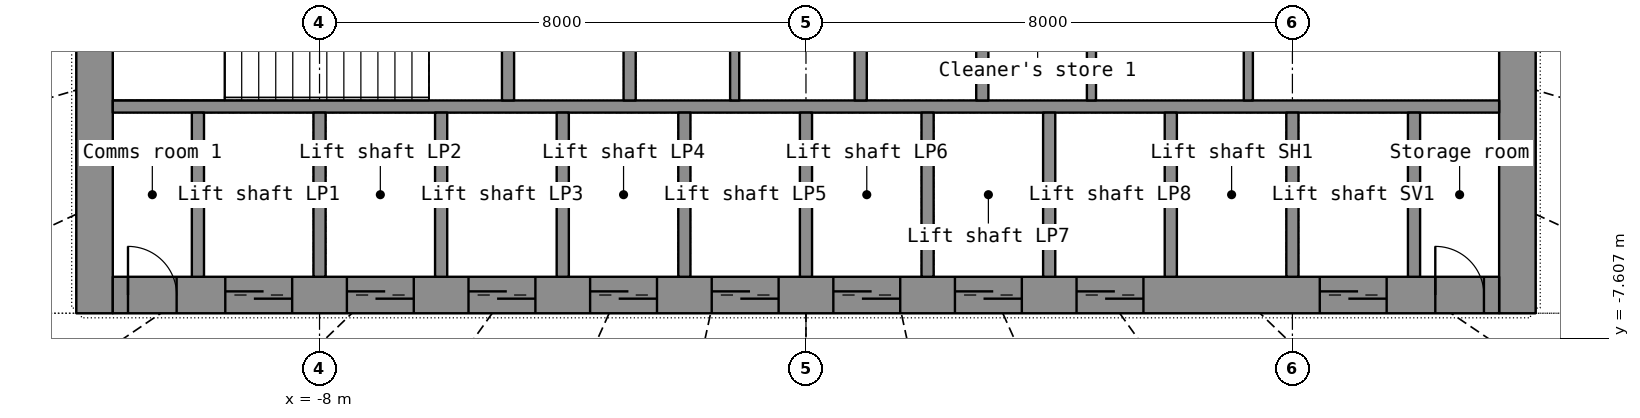
"""IFC4 building model, lengths in metres.
Left out: names, types, materials, properties, quantities, classifications, styles, units other than length and angle.
Written with IfcOpenShell. Run it as: python <this file> out.ifc"""

import sys

from ifc_helpers import new_model, si_unit, direction, frame, frame_2d, origin, place, context, subcontext, project, spatial, rectangle, extrude, element, fill, save


model = new_model("IFC4")
c1 = context("Model", 3, precision=1e-05, world=origin(), true_north=direction((0.0, 1.0)))
c2 = subcontext(c1, "Body", "Model", "MODEL_VIEW")
j1 = project(units=[si_unit("LENGTHUNIT", "METRE"), si_unit("PLANEANGLEUNIT", "RADIAN")], contexts=[c1])
p1 = place(None, origin())
s1 = spatial("IfcSite", under=j1, at=p1, CompositionType="ELEMENT")
p2 = place(p1, origin())
s2 = spatial("IfcBuilding", under=s1, at=p2, CompositionType="ELEMENT")
p3 = place(p2, frame((0.0, 0.0, 20.0)))
s3 = spatial("IfcBuildingStorey", under=s2, at=p3, CompositionType="ELEMENT", Elevation=20.0)
p4 = place(p3, frame((-11.7, -7.2, 0.0), z_axis=(0.0, 0.0, 1.0), x_axis=(0.0, 1.0, 0.0)))
e1 = element("IfcWall", 1, at=p4, inside=s3, PredefinedType="SHEAR", context=c2, shape_type="SweptSolid", body=[
    extrude(rectangle(XDim=14.4, YDim=0.6, at=frame_2d((7.2, 0.0))), origin(), (0.0, 0.0, 1.0), 4.1),
])
p5 = place(p4, frame((6.5, 0.0, 0.0)))
e2 = element("IfcOpeningElement", 2, at=p5, cuts=e1, PredefinedType="OPENING", context=c2, shape_type="SweptSolid", body=[
    extrude(rectangle(XDim=1.4, YDim=2.2, at=frame_2d((0.7, 1.1))), frame((0.0, 0.31, 0.0), z_axis=(0.0, -1.0, 0.0), x_axis=(1.0, 0.0, 0.0)), (0.0, 0.0, 1.0), 0.62),
])
p6 = place(p3, frame((11.7, -7.2, 0.0), z_axis=(0.0, 0.0, 1.0), x_axis=(0.0, 1.0, 0.0)))
e3 = element("IfcWall", 3, at=p6, inside=s3, PredefinedType="SHEAR", context=c2, shape_type="SweptSolid", body=[
    extrude(rectangle(XDim=14.4, YDim=0.6, at=frame_2d((7.2, 0.0))), origin(), (0.0, 0.0, 1.0), 4.1),
])
p7 = place(p6, frame((6.5, 0.0, 0.0)))
e4 = element("IfcOpeningElement", 4, at=p7, cuts=e3, PredefinedType="OPENING", context=c2, shape_type="SweptSolid", body=[
    extrude(rectangle(XDim=1.4, YDim=2.2, at=frame_2d((0.7, 1.1))), frame((0.0, 0.31, 0.0), z_axis=(0.0, -1.0, 0.0), x_axis=(1.0, 0.0, 0.0)), (0.0, 0.0, 1.0), 0.62),
])
p8 = place(p3, frame((-11.4, -6.9, 0.0), z_axis=(0.0, 0.0, 1.0), x_axis=(1.0, 0.0, 0.0)))
e5 = element("IfcWall", 5, at=p8, inside=s3, PredefinedType="SHEAR", context=c2, shape_type="SweptSolid", body=[
    extrude(rectangle(XDim=22.8, YDim=0.6, at=frame_2d((11.4, 0.0))), origin(), (0.0, 0.0, 1.0), 4.1),
])
p9 = place(p8, frame((1.85, 0.0, 0.0)))
e6 = element("IfcOpeningElement", 6, at=p9, cuts=e5, PredefinedType="OPENING", context=c2, shape_type="SweptSolid", body=[
    extrude(rectangle(XDim=1.1, YDim=2.2, at=frame_2d((0.55, 1.1))), frame((0.0, 0.31, 0.0), z_axis=(0.0, -1.0, 0.0), x_axis=(1.0, 0.0, 0.0)), (0.0, 0.0, 1.0), 0.62),
])
p10 = place(p8, frame((3.85, 0.0, 0.0)))
e7 = element("IfcOpeningElement", 7, at=p10, cuts=e5, PredefinedType="OPENING", context=c2, shape_type="SweptSolid", body=[
    extrude(rectangle(XDim=1.1, YDim=2.2, at=frame_2d((0.55, 1.1))), frame((0.0, 0.31, 0.0), z_axis=(0.0, -1.0, 0.0), x_axis=(1.0, 0.0, 0.0)), (0.0, 0.0, 1.0), 0.62),
])
p11 = place(p8, frame((5.85, 0.0, 0.0)))
e8 = element("IfcOpeningElement", 8, at=p11, cuts=e5, PredefinedType="OPENING", context=c2, shape_type="SweptSolid", body=[
    extrude(rectangle(XDim=1.1, YDim=2.2, at=frame_2d((0.55, 1.1))), frame((0.0, 0.31, 0.0), z_axis=(0.0, -1.0, 0.0), x_axis=(1.0, 0.0, 0.0)), (0.0, 0.0, 1.0), 0.62),
])
p12 = place(p8, frame((7.85, 0.0, 0.0)))
e9 = element("IfcOpeningElement", 9, at=p12, cuts=e5, PredefinedType="OPENING", context=c2, shape_type="SweptSolid", body=[
    extrude(rectangle(XDim=1.1, YDim=2.2, at=frame_2d((0.55, 1.1))), frame((0.0, 0.31, 0.0), z_axis=(0.0, -1.0, 0.0), x_axis=(1.0, 0.0, 0.0)), (0.0, 0.0, 1.0), 0.62),
])
p13 = place(p8, frame((9.85, 0.0, 0.0)))
e10 = element("IfcOpeningElement", 10, at=p13, cuts=e5, PredefinedType="OPENING", context=c2, shape_type="SweptSolid", body=[
    extrude(rectangle(XDim=1.1, YDim=2.2, at=frame_2d((0.55, 1.1))), frame((0.0, 0.31, 0.0), z_axis=(0.0, -1.0, 0.0), x_axis=(1.0, 0.0, 0.0)), (0.0, 0.0, 1.0), 0.62),
])
p14 = place(p8, frame((11.85, 0.0, 0.0)))
e11 = element("IfcOpeningElement", 11, at=p14, cuts=e5, PredefinedType="OPENING", context=c2, shape_type="SweptSolid", body=[
    extrude(rectangle(XDim=1.1, YDim=2.2, at=frame_2d((0.55, 1.1))), frame((0.0, 0.31, 0.0), z_axis=(0.0, -1.0, 0.0), x_axis=(1.0, 0.0, 0.0)), (0.0, 0.0, 1.0), 0.62),
])
p15 = place(p8, frame((13.85, 0.0, 0.0)))
e12 = element("IfcOpeningElement", 12, at=p15, cuts=e5, PredefinedType="OPENING", context=c2, shape_type="SweptSolid", body=[
    extrude(rectangle(XDim=1.1, YDim=2.2, at=frame_2d((0.55, 1.1))), frame((0.0, 0.31, 0.0), z_axis=(0.0, -1.0, 0.0), x_axis=(1.0, 0.0, 0.0)), (0.0, 0.0, 1.0), 0.62),
])
p16 = place(p8, frame((15.85, 0.0, 0.0)))
e13 = element("IfcOpeningElement", 13, at=p16, cuts=e5, PredefinedType="OPENING", context=c2, shape_type="SweptSolid", body=[
    extrude(rectangle(XDim=1.1, YDim=2.2, at=frame_2d((0.55, 1.1))), frame((0.0, 0.31, 0.0), z_axis=(0.0, -1.0, 0.0), x_axis=(1.0, 0.0, 0.0)), (0.0, 0.0, 1.0), 0.62),
])
p17 = place(p8, frame((19.85, 0.0, 0.0)))
e14 = element("IfcOpeningElement", 14, at=p17, cuts=e5, PredefinedType="OPENING", context=c2, shape_type="SweptSolid", body=[
    extrude(rectangle(XDim=1.1, YDim=2.2, at=frame_2d((0.55, 1.1))), frame((0.0, 0.31, 0.0), z_axis=(0.0, -1.0, 0.0), x_axis=(1.0, 0.0, 0.0)), (0.0, 0.0, 1.0), 0.62),
])
p18 = place(p8, frame((0.25, 0.0, 0.0)))
e15 = element("IfcOpeningElement", 15, at=p18, cuts=e5, PredefinedType="OPENING", context=c2, shape_type="SweptSolid", body=[
    extrude(rectangle(XDim=0.8, YDim=2.05, at=frame_2d((0.4, 1.025))), frame((0.0, 0.31, 0.0), z_axis=(0.0, -1.0, 0.0), x_axis=(1.0, 0.0, 0.0)), (0.0, 0.0, 1.0), 0.62),
])
p19 = place(p8, frame((21.75, 0.0, 0.0)))
e16 = element("IfcOpeningElement", 16, at=p19, cuts=e5, PredefinedType="OPENING", context=c2, shape_type="SweptSolid", body=[
    extrude(rectangle(XDim=0.8, YDim=2.05, at=frame_2d((0.4, 1.025))), frame((0.0, 0.31, 0.0), z_axis=(0.0, -1.0, 0.0), x_axis=(1.0, 0.0, 0.0)), (0.0, 0.0, 1.0), 0.62),
])
p20 = place(p3, frame((-11.4, -3.8, 0.0), z_axis=(0.0, 0.0, 1.0), x_axis=(1.0, 0.0, 0.0)))
e17 = element("IfcWall", 17, at=p20, inside=s3, PredefinedType="SHEAR", context=c2, shape_type="SweptSolid", body=[
    extrude(rectangle(XDim=22.8, YDim=0.2, at=frame_2d((11.4, 0.0))), origin(), (0.0, 0.0, 1.0), 4.1),
])
for number, where, z_axis, x_axis in (
    (18, (-10.0, -6.6, 0.0), (0.0, 0.0, 1.0), (0.0, 1.0, 0.0)),
    (19, (-8.0, -6.6, 0.0), (0.0, 0.0, 1.0), (0.0, 1.0, 0.0)),
    (20, (-6.0, -6.6, 0.0), (0.0, 0.0, 1.0), (0.0, 1.0, 0.0)),
    (21, (-4.0, -6.6, 0.0), (0.0, 0.0, 1.0), (0.0, 1.0, 0.0)),
    (22, (-2.0, -6.6, 0.0), (0.0, 0.0, 1.0), (0.0, 1.0, 0.0)),
    (23, (0.0, -6.6, 0.0), (0.0, 0.0, 1.0), (0.0, 1.0, 0.0)),
    (24, (2.0, -6.6, 0.0), (0.0, 0.0, 1.0), (0.0, 1.0, 0.0)),
    (25, (4.0, -6.6, 0.0), (0.0, 0.0, 1.0), (0.0, 1.0, 0.0)),
    (26, (6.0, -6.6, 0.0), (0.0, 0.0, 1.0), (0.0, 1.0, 0.0)),
    (27, (8.0, -6.6, 0.0), (0.0, 0.0, 1.0), (0.0, 1.0, 0.0)),
    (28, (10.0, -6.6, 0.0), (0.0, 0.0, 1.0), (0.0, 1.0, 0.0)),
):
    element("IfcWall", number, at=place(p3, frame(where, z_axis=z_axis, x_axis=x_axis)), inside=s3, PredefinedType="SHEAR", context=c2, shape_type="SweptSolid", body=[
        extrude(rectangle(XDim=2.7, YDim=0.2, at=frame_2d((1.35, 0.0))), origin(), (0.0, 0.0, 1.0), 4.1),
    ])
p21 = place(p3, frame((-2.9, -3.7, 0.0), z_axis=(0.0, 0.0, 1.0), x_axis=(0.0, 1.0, 0.0)))
e29 = element("IfcWall", 29, at=p21, inside=s3, PredefinedType="SHEAR", context=c2, shape_type="SweptSolid", body=[
    extrude(rectangle(XDim=7.4, YDim=0.2, at=frame_2d((3.7, 0.0))), origin(), (0.0, 0.0, 1.0), 4.1),
])
p22 = place(p21, frame((3.1, 0.0, 0.0)))
e30 = element("IfcOpeningElement", 30, at=p22, cuts=e29, PredefinedType="OPENING", context=c2, shape_type="SweptSolid", body=[
    extrude(rectangle(XDim=1.2, YDim=2.2, at=frame_2d((0.6, 1.1))), frame((0.0, 0.11, 0.0), z_axis=(0.0, -1.0, 0.0), x_axis=(1.0, 0.0, 0.0)), (0.0, 0.0, 1.0), 0.22),
])
p23 = place(p3, frame((2.9, -3.7, 0.0), z_axis=(0.0, 0.0, 1.0), x_axis=(0.0, 1.0, 0.0)))
e31 = element("IfcWall", 31, at=p23, inside=s3, PredefinedType="SHEAR", context=c2, shape_type="SweptSolid", body=[
    extrude(rectangle(XDim=7.4, YDim=0.2, at=frame_2d((3.7, 0.0))), origin(), (0.0, 0.0, 1.0), 4.1),
])
p24 = place(p23, frame((3.1, 0.0, 0.0)))
e32 = element("IfcOpeningElement", 32, at=p24, cuts=e31, PredefinedType="OPENING", context=c2, shape_type="SweptSolid", body=[
    extrude(rectangle(XDim=1.2, YDim=2.2, at=frame_2d((0.6, 1.1))), frame((0.0, 0.11, 0.0), z_axis=(0.0, -1.0, 0.0), x_axis=(1.0, 0.0, 0.0)), (0.0, 0.0, 1.0), 0.22),
])
for number, where, z_axis, x_axis in (
    (33, (0.9, -3.7, 0.0), (0.0, 0.0, 1.0), (0.0, 1.0, 0.0)),
    (34, (-4.9, -3.7, 0.0), (0.0, 0.0, 1.0), (0.0, 1.0, 0.0)),
):
    element("IfcWall", number, at=place(p3, frame(where, z_axis=z_axis, x_axis=x_axis)), inside=s3, PredefinedType="SHEAR", context=c2, shape_type="SweptSolid", body=[
        extrude(rectangle(XDim=2.35, YDim=0.2, at=frame_2d((1.175, 0.0))), origin(), (0.0, 0.0, 1.0), 4.1),
    ])
for number, where, z_axis, x_axis in (
    (35, (4.695, -3.7, 0.0), (0.0, 0.0, 1.0), (0.0, 1.0, 0.0)),
    (36, (7.275, -3.7, 0.0), (0.0, 0.0, 1.0), (0.0, 1.0, 0.0)),
    (37, (-1.173, -3.7, 0.0), (0.0, 0.0, 1.0), (0.0, 1.0, 0.0)),
):
    element("IfcWall", number, at=place(p3, frame(where, z_axis=z_axis, x_axis=x_axis)), inside=s3, PredefinedType="PARTITIONING", context=c2, shape_type="SweptSolid", body=[
        extrude(rectangle(XDim=2.35, YDim=0.15, at=frame_2d((1.175, 0.0))), origin(), (0.0, 0.0, 1.0), 4.1),
    ])
p25 = place(p9, origin())
e38 = element("IfcDoor", 38, at=p25, inside=s3, OperationType="DOUBLE_DOOR_SLIDING", PredefinedType="DOOR", context=c2, shape_type="SweptSolid", body=[
    extrude(rectangle(XDim=1.1, YDim=2.2, at=frame_2d((0.55, 1.1))), frame((0.0, 0.025, 0.0), z_axis=(0.0, -1.0, 0.0), x_axis=(1.0, 0.0, 0.0)), (0.0, 0.0, 1.0), 0.05),
])
fill(e6, e38)
p26 = place(p10, origin())
e39 = element("IfcDoor", 39, at=p26, inside=s3, OperationType="DOUBLE_DOOR_SLIDING", PredefinedType="DOOR", context=c2, shape_type="SweptSolid", body=[
    extrude(rectangle(XDim=1.1, YDim=2.2, at=frame_2d((0.55, 1.1))), frame((0.0, 0.025, 0.0), z_axis=(0.0, -1.0, 0.0), x_axis=(1.0, 0.0, 0.0)), (0.0, 0.0, 1.0), 0.05),
])
fill(e7, e39)
p27 = place(p11, origin())
e40 = element("IfcDoor", 40, at=p27, inside=s3, OperationType="DOUBLE_DOOR_SLIDING", PredefinedType="DOOR", context=c2, shape_type="SweptSolid", body=[
    extrude(rectangle(XDim=1.1, YDim=2.2, at=frame_2d((0.55, 1.1))), frame((0.0, 0.025, 0.0), z_axis=(0.0, -1.0, 0.0), x_axis=(1.0, 0.0, 0.0)), (0.0, 0.0, 1.0), 0.05),
])
fill(e8, e40)
p28 = place(p12, origin())
e41 = element("IfcDoor", 41, at=p28, inside=s3, OperationType="DOUBLE_DOOR_SLIDING", PredefinedType="DOOR", context=c2, shape_type="SweptSolid", body=[
    extrude(rectangle(XDim=1.1, YDim=2.2, at=frame_2d((0.55, 1.1))), frame((0.0, 0.025, 0.0), z_axis=(0.0, -1.0, 0.0), x_axis=(1.0, 0.0, 0.0)), (0.0, 0.0, 1.0), 0.05),
])
fill(e9, e41)
p29 = place(p13, origin())
e42 = element("IfcDoor", 42, at=p29, inside=s3, OperationType="DOUBLE_DOOR_SLIDING", PredefinedType="DOOR", context=c2, shape_type="SweptSolid", body=[
    extrude(rectangle(XDim=1.1, YDim=2.2, at=frame_2d((0.55, 1.1))), frame((0.0, 0.025, 0.0), z_axis=(0.0, -1.0, 0.0), x_axis=(1.0, 0.0, 0.0)), (0.0, 0.0, 1.0), 0.05),
])
fill(e10, e42)
p30 = place(p14, origin())
e43 = element("IfcDoor", 43, at=p30, inside=s3, OperationType="DOUBLE_DOOR_SLIDING", PredefinedType="DOOR", context=c2, shape_type="SweptSolid", body=[
    extrude(rectangle(XDim=1.1, YDim=2.2, at=frame_2d((0.55, 1.1))), frame((0.0, 0.025, 0.0), z_axis=(0.0, -1.0, 0.0), x_axis=(1.0, 0.0, 0.0)), (0.0, 0.0, 1.0), 0.05),
])
fill(e11, e43)
p31 = place(p15, origin())
e44 = element("IfcDoor", 44, at=p31, inside=s3, OperationType="DOUBLE_DOOR_SLIDING", PredefinedType="DOOR", context=c2, shape_type="SweptSolid", body=[
    extrude(rectangle(XDim=1.1, YDim=2.2, at=frame_2d((0.55, 1.1))), frame((0.0, 0.025, 0.0), z_axis=(0.0, -1.0, 0.0), x_axis=(1.0, 0.0, 0.0)), (0.0, 0.0, 1.0), 0.05),
])
fill(e12, e44)
p32 = place(p16, origin())
e45 = element("IfcDoor", 45, at=p32, inside=s3, OperationType="DOUBLE_DOOR_SLIDING", PredefinedType="DOOR", context=c2, shape_type="SweptSolid", body=[
    extrude(rectangle(XDim=1.1, YDim=2.2, at=frame_2d((0.55, 1.1))), frame((0.0, 0.025, 0.0), z_axis=(0.0, -1.0, 0.0), x_axis=(1.0, 0.0, 0.0)), (0.0, 0.0, 1.0), 0.05),
])
fill(e13, e45)
p33 = place(p17, origin())
e46 = element("IfcDoor", 46, at=p33, inside=s3, OperationType="DOUBLE_DOOR_SLIDING", PredefinedType="DOOR", context=c2, shape_type="SweptSolid", body=[
    extrude(rectangle(XDim=1.1, YDim=2.2, at=frame_2d((0.55, 1.1))), frame((0.0, 0.025, 0.0), z_axis=(0.0, -1.0, 0.0), x_axis=(1.0, 0.0, 0.0)), (0.0, 0.0, 1.0), 0.05),
])
fill(e14, e46)
p34 = place(p18, origin())
e47 = element("IfcDoor", 47, at=p34, inside=s3, OperationType="SINGLE_SWING_LEFT", PredefinedType="DOOR", context=c2, shape_type="SweptSolid", body=[
    extrude(rectangle(XDim=0.8, YDim=2.05, at=frame_2d((0.4, 1.025))), frame((0.0, 0.025, 0.0), z_axis=(0.0, -1.0, 0.0), x_axis=(1.0, 0.0, 0.0)), (0.0, 0.0, 1.0), 0.05),
])
fill(e15, e47)
p35 = place(p19, origin())
e48 = element("IfcDoor", 48, at=p35, inside=s3, OperationType="SINGLE_SWING_LEFT", PredefinedType="DOOR", context=c2, shape_type="SweptSolid", body=[
    extrude(rectangle(XDim=0.8, YDim=2.05, at=frame_2d((0.4, 1.025))), frame((0.0, 0.025, 0.0), z_axis=(0.0, -1.0, 0.0), x_axis=(1.0, 0.0, 0.0)), (0.0, 0.0, 1.0), 0.05),
])
fill(e16, e48)
save(model, sys.argv[1])
